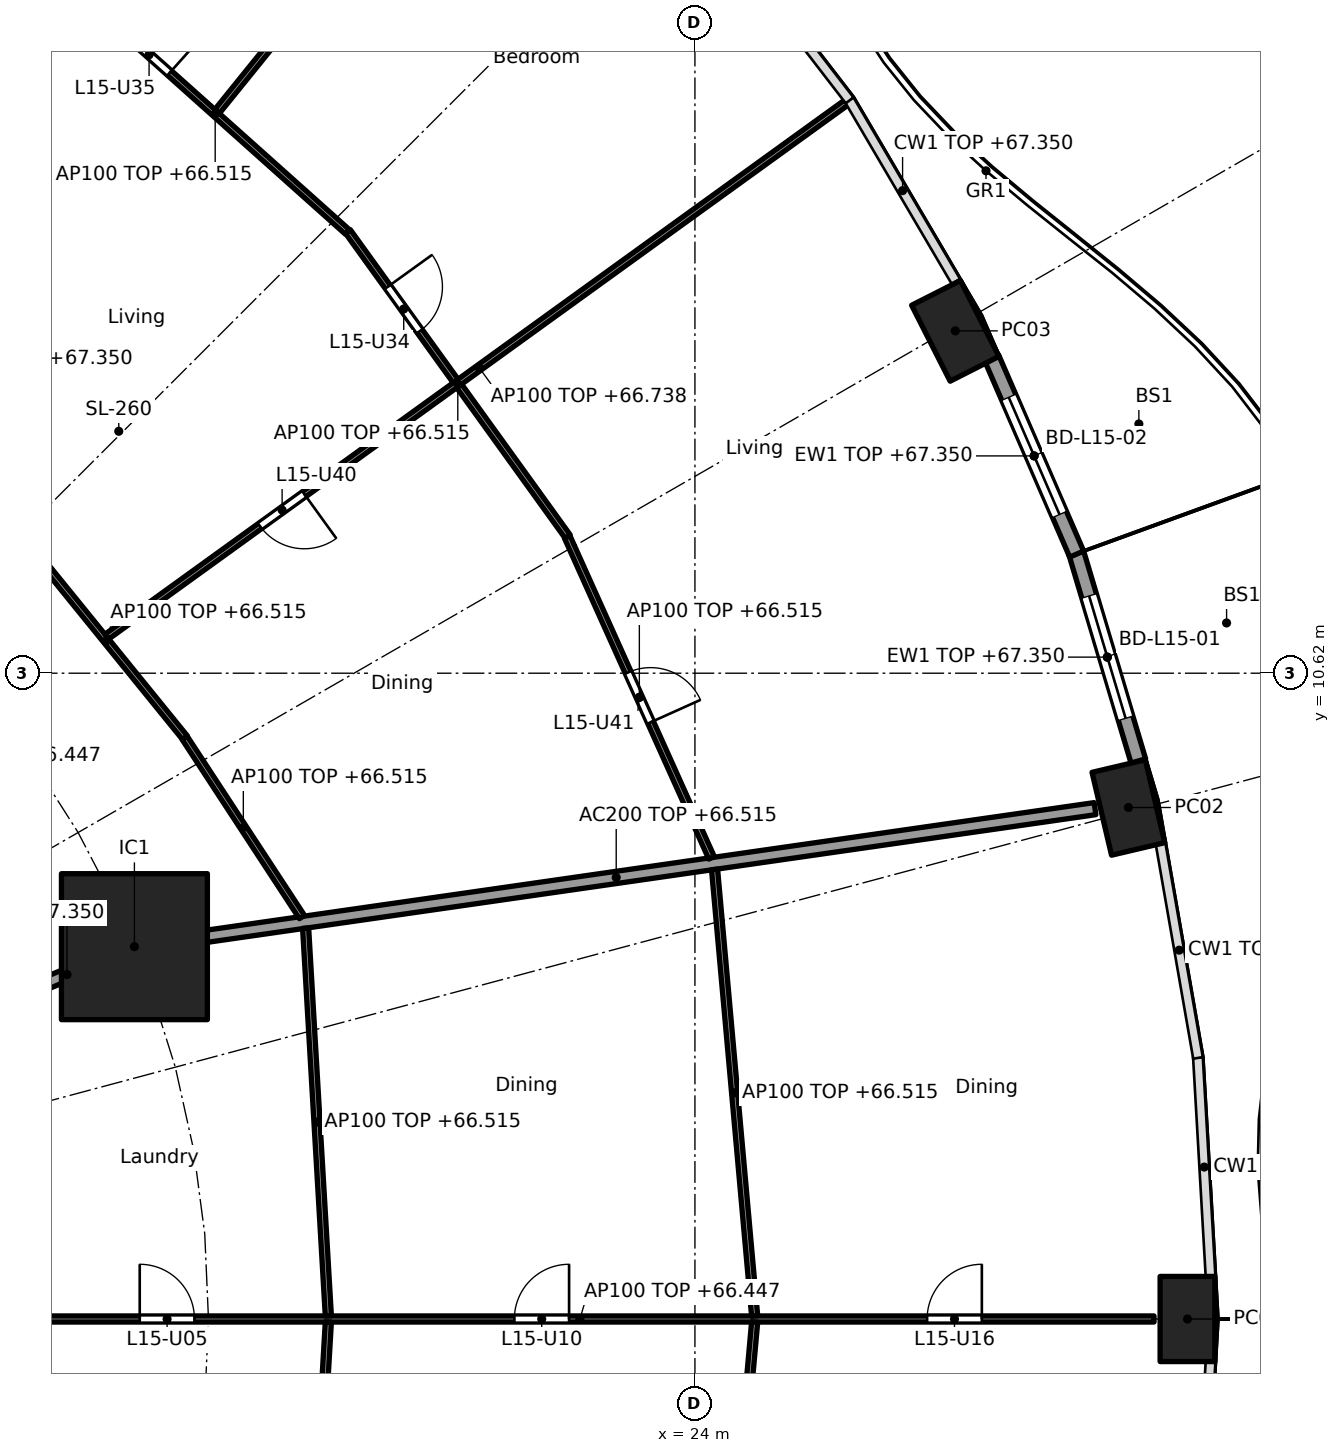
"""IFC4 building model, lengths in metres.
Left out: names, types, materials, properties, quantities, classifications, styles, units other than length and angle.
Written with IfcOpenShell. Run it as: python <this file> out.ifc"""

import sys

from ifc_helpers import new_model, si_unit, direction, frame, frame_2d, origin, origin_2d, place, context, subcontext, project, spatial, rectangle, hollow_rectangle, extrude, element, fill, save


model = new_model("IFC4")
c1 = context("Model", 3, precision=1e-05, world=origin(), true_north=direction((0.0, 1.0)))
c2 = subcontext(c1, "Body", "Model", "MODEL_VIEW")
j1 = project(units=[si_unit("LENGTHUNIT", "METRE"), si_unit("PLANEANGLEUNIT", "RADIAN")], contexts=[c1])
p1 = place(None, origin())
s1 = spatial("IfcSite", under=j1, at=p1, CompositionType="ELEMENT")
p2 = place(p1, origin())
s2 = spatial("IfcBuilding", under=s1, at=p2, CompositionType="ELEMENT")
p3 = place(p2, frame((0.0, 0.0, 64.0)))
s3 = spatial("IfcBuildingStorey", under=s2, at=p3, CompositionType="ELEMENT", Elevation=64.0)
for number, where, z_axis, x_axis in (
    (1, (32.1, 0.0, 0.0), (0.0, 0.0, 1.0), (0.0, 1.0, 0.0)),
    (2, (31.129, 8.412, 0.0), (0.0, 0.0, 1.0), (-0.229, 0.973, 0.0)),
    (3, (28.282, 16.25, 0.0), (0.0, 0.0, 1.0), (-0.452, 0.892, 0.0)),
):
    element("IfcColumn", number, at=place(p3, frame(where, z_axis=z_axis, x_axis=x_axis)), inside=s3, PredefinedType="COLUMN", context=c2, shape_type="SweptSolid", body=[
        extrude(hollow_rectangle(XDim=1.4, YDim=0.9, WallThickness=0.05, at=origin_2d()), origin(), (0.0, 0.0, 1.0), 3.7),
    ])
p4 = place(p3, frame((14.782, 6.123, 0.0), z_axis=(0.0, 0.0, 1.0), x_axis=(1.0, 0.0, 0.0)))
e4 = element("IfcColumn", 4, at=p4, inside=s3, PredefinedType="COLUMN", context=c2, shape_type="SweptSolid", body=[
    extrude(rectangle(XDim=2.4, YDim=2.4, at=origin_2d()), origin(), (0.0, 0.0, 1.0), 3.7),
])
p5 = place(p3, frame((30.273, 12.593, 0.0), z_axis=(0.0, 0.0, 1.0), x_axis=(0.285871309426, -0.958268018065, 0.0)))
e5 = element("IfcWall", 5, at=p5, inside=s3, PredefinedType="SOLIDWALL", context=c2, shape_type="SweptSolid", body=[
    extrude(rectangle(XDim=3.565, YDim=0.25, at=frame_2d((1.783, 0.0))), origin(), (0.0, 0.0, 1.0), 3.35),
])
p6 = place(p5, frame((0.733, 0.0, 0.0)))
e6 = element("IfcOpeningElement", 6, at=p6, cuts=e5, PredefinedType="OPENING", context=c2, shape_type="SweptSolid", body=[
    extrude(rectangle(XDim=2.1, YDim=2.4, at=frame_2d((1.05, 1.2))), frame((0.0, 0.135, 0.0), z_axis=(0.0, -1.0, 0.0), x_axis=(1.0, 0.0, 0.0)), (0.0, 0.0, 1.0), 0.27),
])
p7 = place(p3, frame((28.878, 15.808, 0.0), z_axis=(0.0, 0.0, 1.0), x_axis=(0.397624958345, -0.917548032803, 0.0)))
e7 = element("IfcWall", 7, at=p7, inside=s3, PredefinedType="SOLIDWALL", context=c2, shape_type="SweptSolid", body=[
    extrude(rectangle(XDim=3.52, YDim=0.25, at=frame_2d((1.76, 0.0))), origin(), (0.0, 0.0, 1.0), 3.35),
])
p8 = place(p7, frame((0.71, 0.0, 0.0)))
e8 = element("IfcOpeningElement", 8, at=p8, cuts=e7, PredefinedType="OPENING", context=c2, shape_type="SweptSolid", body=[
    extrude(rectangle(XDim=2.1, YDim=2.4, at=frame_2d((1.05, 1.2))), frame((0.0, 0.135, 0.0), z_axis=(0.0, -1.0, 0.0), x_axis=(1.0, 0.0, 0.0)), (0.0, 0.0, 1.0), 0.27),
])
p9 = place(p3, frame((12.657, 5.243, 0.0), z_axis=(0.0, 0.0, 1.0), x_axis=(0.923853160736, 0.382747093259, 0.0)))
e9 = element("IfcWall", 9, at=p9, inside=s3, PredefinedType="PARTITIONING", context=c2, shape_type="SweptSolid", body=[
    extrude(rectangle(XDim=2.2, YDim=0.2, at=frame_2d((1.1, 0.0))), origin(), (0.0, 0.0, 1.0), 3.35),
])
p10 = place(p3, frame((14.832, 6.13, 0.0), z_axis=(0.0, 0.0, 1.0), x_axis=(0.989836541293, 0.142209779978, 0.0)))
e10 = element("IfcWall", 10, at=p10, inside=s3, PredefinedType="PARTITIONING", context=c2, shape_type="SweptSolid", body=[
    extrude(rectangle(XDim=15.909, YDim=0.2, at=frame_2d((7.955, 0.0))), origin(), (0.0, 0.0, 1.0), 2.515),
])
p11 = place(p3, frame((12.665, 0.0, 0.0), z_axis=(0.0, 0.0, 1.0), x_axis=(1.0, 0.0, 0.0)))
e11 = element("IfcWall", 11, at=p11, inside=s3, PredefinedType="PARTITIONING", context=c2, shape_type="SweptSolid", body=[
    extrude(rectangle(XDim=18.885, YDim=0.1, at=frame_2d((9.443, 0.0))), origin(), (0.0, 0.0, 1.0), 2.447),
])
p12 = place(p11, frame((2.205, 0.0, 0.0)))
e12 = element("IfcOpeningElement", 12, at=p12, cuts=e11, PredefinedType="OPENING", context=c2, shape_type="SweptSolid", body=[
    extrude(rectangle(XDim=0.9, YDim=2.1, at=frame_2d((0.45, 1.05))), frame((0.0, 0.06, 0.0), z_axis=(0.0, -1.0, 0.0), x_axis=(1.0, 0.0, 0.0)), (0.0, 0.0, 1.0), 0.12),
])
p13 = place(p11, frame((8.366, 0.0, 0.0)))
e13 = element("IfcOpeningElement", 13, at=p13, cuts=e11, PredefinedType="OPENING", context=c2, shape_type="SweptSolid", body=[
    extrude(rectangle(XDim=0.9, YDim=2.1, at=frame_2d((0.45, 1.05))), frame((0.0, 0.06, 0.0), z_axis=(0.0, -1.0, 0.0), x_axis=(1.0, 0.0, 0.0)), (0.0, 0.0, 1.0), 0.12),
])
p14 = place(p11, frame((15.154, 0.0, 0.0)))
e14 = element("IfcOpeningElement", 14, at=p14, cuts=e11, PredefinedType="OPENING", context=c2, shape_type="SweptSolid", body=[
    extrude(rectangle(XDim=0.9, YDim=2.1, at=frame_2d((0.45, 1.05))), frame((0.0, 0.06, 0.0), z_axis=(0.0, -1.0, 0.0), x_axis=(1.0, 0.0, 0.0)), (0.0, 0.0, 1.0), 0.12),
])
p15 = place(p3, frame((17.971, 0.05, 0.0), z_axis=(0.0, 0.0, 1.0), x_axis=(-0.058513659907, 0.998286607946, 0.0)))
e15 = element("IfcWall", 15, at=p15, inside=s3, PredefinedType="PARTITIONING", context=c2, shape_type="SweptSolid", body=[
    extrude(rectangle(XDim=6.388, YDim=0.1, at=frame_2d((3.194, 0.0))), origin(), (0.0, 0.0, 1.0), 2.515),
])
p16 = place(p3, frame((17.971, -0.05, 0.0), z_axis=(0.0, 0.0, 1.0), x_axis=(-0.058475267553, -0.998288857538, 0.0)))
e16 = element("IfcWall", 16, at=p16, inside=s3, PredefinedType="PARTITIONING", context=c2, shape_type="SweptSolid", body=[
    extrude(rectangle(XDim=6.438, YDim=0.1, at=frame_2d((3.219, 0.0))), origin(), (0.0, 0.0, 1.0), 2.515),
])
p17 = place(p3, frame((24.982, 0.05, 0.0), z_axis=(0.0, 0.0, 1.0), x_axis=(-0.08944290521, 0.995991951126, 0.0)))
e17 = element("IfcWall", 17, at=p17, inside=s3, PredefinedType="PARTITIONING", context=c2, shape_type="SweptSolid", body=[
    extrude(rectangle(XDim=7.373, YDim=0.1, at=frame_2d((3.686, 0.0))), origin(), (0.0, 0.0, 1.0), 2.515),
])
p18 = place(p3, frame((24.982, -0.05, 0.0), z_axis=(0.0, 0.0, 1.0), x_axis=(-0.089432471274, -0.995992888068, 0.0)))
e18 = element("IfcWall", 18, at=p18, inside=s3, PredefinedType="PARTITIONING", context=c2, shape_type="SweptSolid", body=[
    extrude(rectangle(XDim=7.423, YDim=0.1, at=frame_2d((3.711, 0.0))), origin(), (0.0, 0.0, 1.0), 2.515),
])
p19 = place(p3, frame((17.537, 6.61, 0.0), z_axis=(0.0, 0.0, 1.0), x_axis=(-0.547637987196, 0.836715384692, 0.0)))
e19 = element("IfcWall", 19, at=p19, inside=s3, PredefinedType="PARTITIONING", context=c2, shape_type="SweptSolid", body=[
    extrude(rectangle(XDim=3.52, YDim=0.1, at=frame_2d((1.76, 0.0))), origin(), (0.0, 0.0, 1.0), 2.515),
])
p20 = place(p3, frame((24.273, 7.584, 0.0), z_axis=(0.0, 0.0, 1.0), x_axis=(-0.410201529109, 0.911994904326, 0.0)))
e20 = element("IfcWall", 20, at=p20, inside=s3, PredefinedType="PARTITIONING", context=c2, shape_type="SweptSolid", body=[
    extrude(rectangle(XDim=5.787, YDim=0.1, at=frame_2d((2.894, 0.0))), origin(), (0.0, 0.0, 1.0), 2.515),
])
p21 = place(p20, frame((2.444, 0.0, 0.0)))
e21 = element("IfcOpeningElement", 21, at=p21, cuts=e20, PredefinedType="OPENING", context=c2, shape_type="SweptSolid", body=[
    extrude(rectangle(XDim=0.9, YDim=2.1, at=frame_2d((0.45, 1.05))), frame((0.0, 0.06, 0.0), z_axis=(0.0, -1.0, 0.0), x_axis=(1.0, 0.0, 0.0)), (0.0, 0.0, 1.0), 0.12),
])
p22 = place(p3, frame((15.614, 9.559, 0.0), z_axis=(0.0, 0.0, 1.0), x_axis=(-0.63012473344, 0.776493928056, 0.0)))
e22 = element("IfcWall", 22, at=p22, inside=s3, PredefinedType="PARTITIONING", context=c2, shape_type="SweptSolid", body=[
    extrude(rectangle(XDim=4.106, YDim=0.1, at=frame_2d((2.053, 0.0))), origin(), (0.0, 0.0, 1.0), 2.515),
])
p23 = place(p3, frame((21.908, 12.866, 0.0), z_axis=(0.0, 0.0, 1.0), x_axis=(-0.584553256988, 0.811355341231, 0.0)))
e23 = element("IfcWall", 23, at=p23, inside=s3, PredefinedType="PARTITIONING", context=c2, shape_type="SweptSolid", body=[
    extrude(rectangle(XDim=6.184, YDim=0.1, at=frame_2d((3.092, 0.0))), origin(), (0.0, 0.0, 1.0), 2.515),
])
p24 = place(p23, frame((4.163, 0.0, 0.0)))
e24 = element("IfcOpeningElement", 24, at=p24, cuts=e23, PredefinedType="OPENING", context=c2, shape_type="SweptSolid", body=[
    extrude(rectangle(XDim=0.9, YDim=2.1, at=frame_2d((0.45, 1.05))), frame((0.0, 0.06, 0.0), z_axis=(0.0, -1.0, 0.0), x_axis=(1.0, 0.0, 0.0)), (0.0, 0.0, 1.0), 0.12),
])
p25 = place(p3, frame((14.329, 11.221, 0.0), z_axis=(0.0, 0.0, 1.0), x_axis=(0.810671130917, 0.58550176558, 0.0)))
e25 = element("IfcWall", 25, at=p25, inside=s3, PredefinedType="PARTITIONING", context=c2, shape_type="SweptSolid", body=[
    extrude(rectangle(XDim=15.106, YDim=0.1, at=frame_2d((7.553, 0.0))), origin(), (0.0, 0.0, 1.0), 2.738),
])
p26 = place(p25, frame((3.105, 0.0, 0.0)))
e26 = element("IfcOpeningElement", 26, at=p26, cuts=e25, PredefinedType="OPENING", context=c2, shape_type="SweptSolid", body=[
    extrude(rectangle(XDim=0.9, YDim=2.1, at=frame_2d((0.45, 1.05))), frame((0.0, 0.06, 0.0), z_axis=(0.0, -1.0, 0.0), x_axis=(1.0, 0.0, 0.0)), (0.0, 0.0, 1.0), 0.12),
])
p27 = place(p3, frame((18.285, 17.877, 0.0), z_axis=(0.0, 0.0, 1.0), x_axis=(-0.745806142791, 0.666163041136, 0.0)))
e27 = element("IfcWall", 27, at=p27, inside=s3, PredefinedType="PARTITIONING", context=c2, shape_type="SweptSolid", body=[
    extrude(rectangle(XDim=5.831, YDim=0.1, at=frame_2d((2.915, 0.0))), origin(), (0.0, 0.0, 1.0), 2.515),
])
p28 = place(p27, frame((3.923, 0.0, 0.0)))
e28 = element("IfcOpeningElement", 28, at=p28, cuts=e27, PredefinedType="OPENING", context=c2, shape_type="SweptSolid", body=[
    extrude(rectangle(XDim=0.9, YDim=2.1, at=frame_2d((0.45, 1.05))), frame((0.0, 0.06, 0.0), z_axis=(0.0, -1.0, 0.0), x_axis=(1.0, 0.0, 0.0)), (0.0, 0.0, 1.0), 0.12),
])
p29 = place(p3, frame((16.142, 19.858, 0.0), z_axis=(0.0, 0.0, 1.0), x_axis=(0.628738066508, 0.777617157555, 0.0)))
e29 = element("IfcWall", 29, at=p29, inside=s3, PredefinedType="PARTITIONING", context=c2, shape_type="SweptSolid", body=[
    extrude(rectangle(XDim=8.091, YDim=0.1, at=frame_2d((4.045, 0.0))), origin(), (0.0, 0.0, 1.0), 2.738),
])
p30 = place(p3, frame((10.003, 15.503, 0.0), z_axis=(0.0, 0.0, 1.0), x_axis=(0.52645953022, 0.850200189979, 0.0)))
e30 = element("IfcWall", 30, at=p30, inside=s3, PredefinedType="PARTITIONING", context=c2, shape_type="SweptSolid", body=[
    extrude(rectangle(XDim=7.45, YDim=0.1, at=frame_2d((3.725, 0.0))), origin(), (0.0, 0.0, 1.0), 2.515),
])
p31 = place(p6, origin())
e31 = element("IfcDoor", 31, at=p31, inside=s3, OperationType="SLIDING_TO_LEFT", PredefinedType="DOOR", context=c2, shape_type="SweptSolid", body=[
    extrude(rectangle(XDim=2.1, YDim=2.4, at=frame_2d((1.05, 1.2))), frame((0.0, 0.025, 0.0), z_axis=(0.0, -1.0, 0.0), x_axis=(1.0, 0.0, 0.0)), (0.0, 0.0, 1.0), 0.05),
])
fill(e6, e31)
p32 = place(p8, origin())
e32 = element("IfcDoor", 32, at=p32, inside=s3, OperationType="SLIDING_TO_LEFT", PredefinedType="DOOR", context=c2, shape_type="SweptSolid", body=[
    extrude(rectangle(XDim=2.1, YDim=2.4, at=frame_2d((1.05, 1.2))), frame((0.0, 0.025, 0.0), z_axis=(0.0, -1.0, 0.0), x_axis=(1.0, 0.0, 0.0)), (0.0, 0.0, 1.0), 0.05),
])
fill(e8, e32)
p33 = place(p12, origin())
e33 = element("IfcDoor", 33, at=p33, inside=s3, OperationType="SINGLE_SWING_LEFT", PredefinedType="DOOR", context=c2, shape_type="SweptSolid", body=[
    extrude(rectangle(XDim=0.9, YDim=2.1, at=frame_2d((0.45, 1.05))), frame((0.0, 0.025, 0.0), z_axis=(0.0, -1.0, 0.0), x_axis=(1.0, 0.0, 0.0)), (0.0, 0.0, 1.0), 0.05),
])
fill(e12, e33)
p34 = place(p13, origin())
e34 = element("IfcDoor", 34, at=p34, inside=s3, OperationType="SINGLE_SWING_RIGHT", PredefinedType="DOOR", context=c2, shape_type="SweptSolid", body=[
    extrude(rectangle(XDim=0.9, YDim=2.1, at=frame_2d((0.45, 1.05))), frame((0.0, 0.025, 0.0), z_axis=(0.0, -1.0, 0.0), x_axis=(1.0, 0.0, 0.0)), (0.0, 0.0, 1.0), 0.05),
])
fill(e13, e34)
p35 = place(p14, origin())
e35 = element("IfcDoor", 35, at=p35, inside=s3, OperationType="SINGLE_SWING_RIGHT", PredefinedType="DOOR", context=c2, shape_type="SweptSolid", body=[
    extrude(rectangle(XDim=0.9, YDim=2.1, at=frame_2d((0.45, 1.05))), frame((0.0, 0.025, 0.0), z_axis=(0.0, -1.0, 0.0), x_axis=(1.0, 0.0, 0.0)), (0.0, 0.0, 1.0), 0.05),
])
fill(e14, e35)
p36 = place(p24, frame((0.9, 0.0, 0.0), x_axis=(-1.0, 0.0, 0.0)))
e36 = element("IfcDoor", 36, at=p36, inside=s3, OperationType="SINGLE_SWING_LEFT", PredefinedType="DOOR", context=c2, shape_type="SweptSolid", body=[
    extrude(rectangle(XDim=0.9, YDim=2.1, at=frame_2d((0.45, 1.05))), frame((0.0, 0.025, 0.0), z_axis=(0.0, -1.0, 0.0), x_axis=(1.0, 0.0, 0.0)), (0.0, 0.0, 1.0), 0.05),
])
fill(e24, e36)
p37 = place(p28, frame((0.9, 0.0, 0.0), x_axis=(-1.0, 0.0, 0.0)))
e37 = element("IfcDoor", 37, at=p37, inside=s3, OperationType="SINGLE_SWING_RIGHT", PredefinedType="DOOR", context=c2, shape_type="SweptSolid", body=[
    extrude(rectangle(XDim=0.9, YDim=2.1, at=frame_2d((0.45, 1.05))), frame((0.0, 0.025, 0.0), z_axis=(0.0, -1.0, 0.0), x_axis=(1.0, 0.0, 0.0)), (0.0, 0.0, 1.0), 0.05),
])
fill(e28, e37)
p38 = place(p26, frame((0.9, 0.0, 0.0), x_axis=(-1.0, 0.0, 0.0)))
e38 = element("IfcDoor", 38, at=p38, inside=s3, OperationType="SINGLE_SWING_LEFT", PredefinedType="DOOR", context=c2, shape_type="SweptSolid", body=[
    extrude(rectangle(XDim=0.9, YDim=2.1, at=frame_2d((0.45, 1.05))), frame((0.0, 0.025, 0.0), z_axis=(0.0, -1.0, 0.0), x_axis=(1.0, 0.0, 0.0)), (0.0, 0.0, 1.0), 0.05),
])
fill(e26, e38)
p39 = place(p21, frame((0.9, 0.0, 0.0), x_axis=(-1.0, 0.0, 0.0)))
e39 = element("IfcDoor", 39, at=p39, inside=s3, OperationType="SINGLE_SWING_RIGHT", PredefinedType="DOOR", context=c2, shape_type="SweptSolid", body=[
    extrude(rectangle(XDim=0.9, YDim=2.1, at=frame_2d((0.45, 1.05))), frame((0.0, 0.025, 0.0), z_axis=(0.0, -1.0, 0.0), x_axis=(1.0, 0.0, 0.0)), (0.0, 0.0, 1.0), 0.05),
])
fill(e21, e39)
save(model, sys.argv[1])
